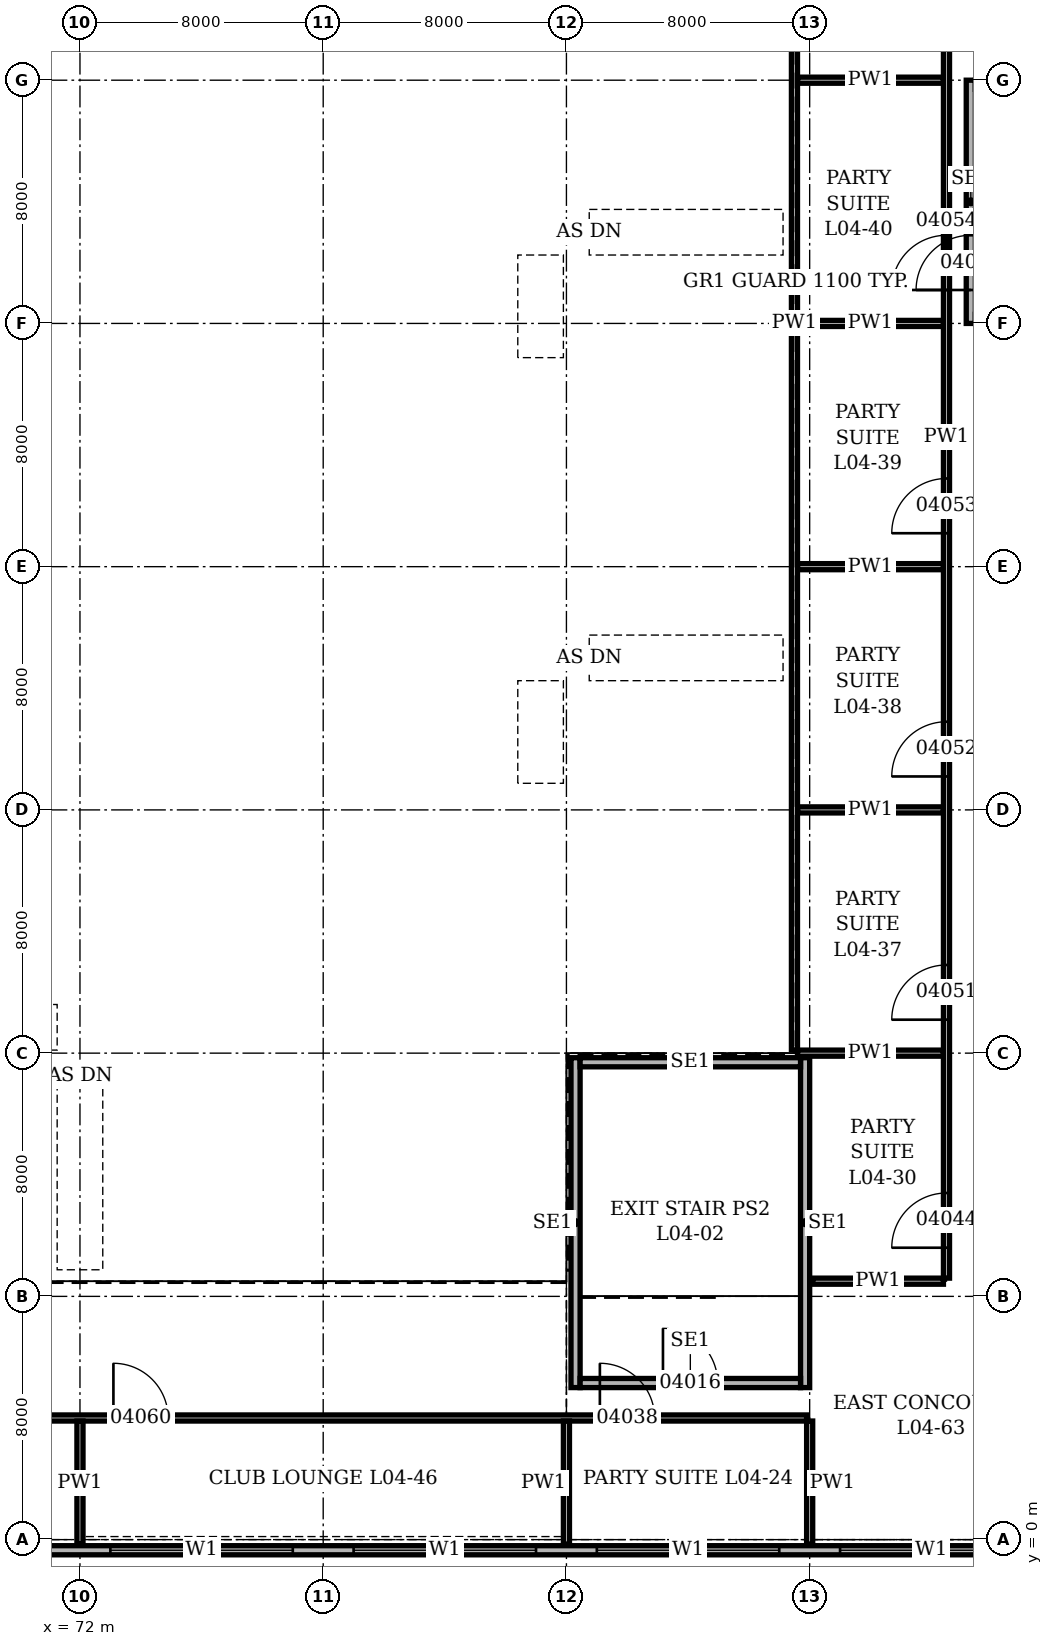
"""IFC4 building model, lengths in metres.
Left out: names, types, materials, properties, quantities, classifications, styles, units other than length and angle.
Written with IfcOpenShell. Run it as: python <this file> out.ifc"""

import sys

from ifc_helpers import new_model, si_unit, direction, frame, frame_2d, origin, place, context, subcontext, project, spatial, rectangle, extrude, element, fill, save


model = new_model("IFC4")
c1 = context("Model", 3, precision=1e-05, world=origin(), true_north=direction((0.0, 1.0)))
c2 = subcontext(c1, "Body", "Model", "MODEL_VIEW")
j1 = project(units=[si_unit("LENGTHUNIT", "METRE"), si_unit("PLANEANGLEUNIT", "RADIAN")], contexts=[c1])
p1 = place(None, origin())
s1 = spatial("IfcSite", under=j1, at=p1, CompositionType="ELEMENT")
p2 = place(p1, origin())
s2 = spatial("IfcBuilding", under=s1, at=p2, CompositionType="ELEMENT")
p3 = place(p2, frame((0.0, 0.0, 19.9)))
s3 = spatial("IfcBuildingStorey", under=s2, at=p3, CompositionType="ELEMENT", Elevation=19.9)
p4 = place(p3, frame((-0.35, -0.35, 0.0), z_axis=(0.0, 0.0, 1.0), x_axis=(1.0, 0.0, 0.0)))
e1 = element("IfcWall", 1, at=p4, inside=s3, PredefinedType="SOLIDWALL", context=c2, shape_type="SweptSolid", body=[
    extrude(rectangle(XDim=112.7, YDim=0.3, at=frame_2d((56.35, 0.0))), origin(), (0.0, 0.0, 1.0), 6.0),
])
p5 = place(p4, frame((1.35, 0.0, 1.0)))
e2 = element("IfcOpeningElement", 2, at=p5, cuts=e1, PredefinedType="OPENING", context=c2, shape_type="SweptSolid", body=[
    extrude(rectangle(XDim=6.0, YDim=1.5, at=frame_2d((3.0, 0.75))), frame((0.0, 0.16, 0.0), z_axis=(0.0, -1.0, 0.0), x_axis=(1.0, 0.0, 0.0)), (0.0, 0.0, 1.0), 0.32),
])
p6 = place(p4, frame((9.35, 0.0, 1.0)))
e3 = element("IfcOpeningElement", 3, at=p6, cuts=e1, PredefinedType="OPENING", context=c2, shape_type="SweptSolid", body=[
    extrude(rectangle(XDim=6.0, YDim=1.5, at=frame_2d((3.0, 0.75))), frame((0.0, 0.16, 0.0), z_axis=(0.0, -1.0, 0.0), x_axis=(1.0, 0.0, 0.0)), (0.0, 0.0, 1.0), 0.32),
])
p7 = place(p4, frame((17.35, 0.0, 1.0)))
e4 = element("IfcOpeningElement", 4, at=p7, cuts=e1, PredefinedType="OPENING", context=c2, shape_type="SweptSolid", body=[
    extrude(rectangle(XDim=6.0, YDim=1.5, at=frame_2d((3.0, 0.75))), frame((0.0, 0.16, 0.0), z_axis=(0.0, -1.0, 0.0), x_axis=(1.0, 0.0, 0.0)), (0.0, 0.0, 1.0), 0.32),
])
p8 = place(p4, frame((25.35, 0.0, 1.0)))
e5 = element("IfcOpeningElement", 5, at=p8, cuts=e1, PredefinedType="OPENING", context=c2, shape_type="SweptSolid", body=[
    extrude(rectangle(XDim=6.0, YDim=1.5, at=frame_2d((3.0, 0.75))), frame((0.0, 0.16, 0.0), z_axis=(0.0, -1.0, 0.0), x_axis=(1.0, 0.0, 0.0)), (0.0, 0.0, 1.0), 0.32),
])
p9 = place(p4, frame((33.35, 0.0, 1.0)))
e6 = element("IfcOpeningElement", 6, at=p9, cuts=e1, PredefinedType="OPENING", context=c2, shape_type="SweptSolid", body=[
    extrude(rectangle(XDim=6.0, YDim=1.5, at=frame_2d((3.0, 0.75))), frame((0.0, 0.16, 0.0), z_axis=(0.0, -1.0, 0.0), x_axis=(1.0, 0.0, 0.0)), (0.0, 0.0, 1.0), 0.32),
])
p10 = place(p4, frame((41.35, 0.0, 1.0)))
e7 = element("IfcOpeningElement", 7, at=p10, cuts=e1, PredefinedType="OPENING", context=c2, shape_type="SweptSolid", body=[
    extrude(rectangle(XDim=6.0, YDim=1.5, at=frame_2d((3.0, 0.75))), frame((0.0, 0.16, 0.0), z_axis=(0.0, -1.0, 0.0), x_axis=(1.0, 0.0, 0.0)), (0.0, 0.0, 1.0), 0.32),
])
p11 = place(p4, frame((49.35, 0.0, 1.0)))
e8 = element("IfcOpeningElement", 8, at=p11, cuts=e1, PredefinedType="OPENING", context=c2, shape_type="SweptSolid", body=[
    extrude(rectangle(XDim=6.0, YDim=1.5, at=frame_2d((3.0, 0.75))), frame((0.0, 0.16, 0.0), z_axis=(0.0, -1.0, 0.0), x_axis=(1.0, 0.0, 0.0)), (0.0, 0.0, 1.0), 0.32),
])
p12 = place(p4, frame((57.35, 0.0, 1.0)))
e9 = element("IfcOpeningElement", 9, at=p12, cuts=e1, PredefinedType="OPENING", context=c2, shape_type="SweptSolid", body=[
    extrude(rectangle(XDim=6.0, YDim=1.5, at=frame_2d((3.0, 0.75))), frame((0.0, 0.16, 0.0), z_axis=(0.0, -1.0, 0.0), x_axis=(1.0, 0.0, 0.0)), (0.0, 0.0, 1.0), 0.32),
])
p13 = place(p4, frame((65.35, 0.0, 1.0)))
e10 = element("IfcOpeningElement", 10, at=p13, cuts=e1, PredefinedType="OPENING", context=c2, shape_type="SweptSolid", body=[
    extrude(rectangle(XDim=6.0, YDim=1.5, at=frame_2d((3.0, 0.75))), frame((0.0, 0.16, 0.0), z_axis=(0.0, -1.0, 0.0), x_axis=(1.0, 0.0, 0.0)), (0.0, 0.0, 1.0), 0.32),
])
p14 = place(p4, frame((73.35, 0.0, 1.0)))
e11 = element("IfcOpeningElement", 11, at=p14, cuts=e1, PredefinedType="OPENING", context=c2, shape_type="SweptSolid", body=[
    extrude(rectangle(XDim=6.0, YDim=1.5, at=frame_2d((3.0, 0.75))), frame((0.0, 0.16, 0.0), z_axis=(0.0, -1.0, 0.0), x_axis=(1.0, 0.0, 0.0)), (0.0, 0.0, 1.0), 0.32),
])
p15 = place(p4, frame((81.35, 0.0, 1.0)))
e12 = element("IfcOpeningElement", 12, at=p15, cuts=e1, PredefinedType="OPENING", context=c2, shape_type="SweptSolid", body=[
    extrude(rectangle(XDim=6.0, YDim=1.5, at=frame_2d((3.0, 0.75))), frame((0.0, 0.16, 0.0), z_axis=(0.0, -1.0, 0.0), x_axis=(1.0, 0.0, 0.0)), (0.0, 0.0, 1.0), 0.32),
])
p16 = place(p4, frame((89.35, 0.0, 1.0)))
e13 = element("IfcOpeningElement", 13, at=p16, cuts=e1, PredefinedType="OPENING", context=c2, shape_type="SweptSolid", body=[
    extrude(rectangle(XDim=6.0, YDim=1.5, at=frame_2d((3.0, 0.75))), frame((0.0, 0.16, 0.0), z_axis=(0.0, -1.0, 0.0), x_axis=(1.0, 0.0, 0.0)), (0.0, 0.0, 1.0), 0.32),
])
p17 = place(p4, frame((97.35, 0.0, 1.0)))
e14 = element("IfcOpeningElement", 14, at=p17, cuts=e1, PredefinedType="OPENING", context=c2, shape_type="SweptSolid", body=[
    extrude(rectangle(XDim=6.0, YDim=1.5, at=frame_2d((3.0, 0.75))), frame((0.0, 0.16, 0.0), z_axis=(0.0, -1.0, 0.0), x_axis=(1.0, 0.0, 0.0)), (0.0, 0.0, 1.0), 0.32),
])
p18 = place(p4, frame((105.35, 0.0, 1.0)))
e15 = element("IfcOpeningElement", 15, at=p18, cuts=e1, PredefinedType="OPENING", context=c2, shape_type="SweptSolid", body=[
    extrude(rectangle(XDim=6.0, YDim=1.5, at=frame_2d((3.0, 0.75))), frame((0.0, 0.16, 0.0), z_axis=(0.0, -1.0, 0.0), x_axis=(1.0, 0.0, 0.0)), (0.0, 0.0, 1.0), 0.32),
])
for number, where, z_axis, x_axis in (
    (16, (88.3, 5.0, 0.0), (0.0, 0.0, 1.0), (0.0, 1.0, 0.0)),
    (17, (95.85, 5.0, 0.0), (0.0, 0.0, 1.0), (0.0, 1.0, 0.0)),
):
    element("IfcWall", number, at=place(p3, frame(where, z_axis=z_axis, x_axis=x_axis)), inside=s3, PredefinedType="SOLIDWALL", context=c2, shape_type="SweptSolid", body=[
        extrude(rectangle(XDim=10.85, YDim=0.3, at=frame_2d((5.425, 0.0))), origin(), (0.0, 0.0, 1.0), 5.75),
    ])
p19 = place(p3, frame((88.45, 5.15, 0.0), z_axis=(0.0, 0.0, 1.0), x_axis=(1.0, 0.0, 0.0)))
e18 = element("IfcWall", 18, at=p19, inside=s3, PredefinedType="SOLIDWALL", context=c2, shape_type="SweptSolid", body=[
    extrude(rectangle(XDim=7.25, YDim=0.3, at=frame_2d((3.625, 0.0))), origin(), (0.0, 0.0, 1.0), 5.75),
])
p20 = place(p19, frame((2.725, 0.0, 0.0)))
e19 = element("IfcOpeningElement", 19, at=p20, cuts=e18, PredefinedType="OPENING", context=c2, shape_type="SweptSolid", body=[
    extrude(rectangle(XDim=1.8, YDim=2.1, at=frame_2d((0.9, 1.05))), frame((0.0, 0.16, 0.0), z_axis=(0.0, -1.0, 0.0), x_axis=(1.0, 0.0, 0.0)), (0.0, 0.0, 1.0), 0.32),
])
p21 = place(p3, frame((88.45, 15.7, 0.0), z_axis=(0.0, 0.0, 1.0), x_axis=(1.0, 0.0, 0.0)))
e20 = element("IfcWall", 20, at=p21, inside=s3, PredefinedType="SOLIDWALL", context=c2, shape_type="SweptSolid", body=[
    extrude(rectangle(XDim=7.25, YDim=0.3, at=frame_2d((3.625, 0.0))), origin(), (0.0, 0.0, 1.0), 5.75),
])
p22 = place(p3, frame((101.3, 40.0, 0.0), z_axis=(0.0, 0.0, 1.0), x_axis=(0.0, 1.0, 0.0)))
e21 = element("IfcWall", 21, at=p22, inside=s3, PredefinedType="SOLIDWALL", context=c2, shape_type="SweptSolid", body=[
    extrude(rectangle(XDim=8.0, YDim=0.3, at=frame_2d((4.0, 0.0))), origin(), (0.0, 0.0, 1.0), 5.75),
])
p23 = place(p22, frame((1.1, 0.0, 0.0)))
e22 = element("IfcOpeningElement", 22, at=p23, cuts=e21, PredefinedType="OPENING", context=c2, shape_type="SweptSolid", body=[
    extrude(rectangle(XDim=1.8, YDim=2.1, at=frame_2d((0.9, 1.05))), frame((0.0, 0.16, 0.0), z_axis=(0.0, -1.0, 0.0), x_axis=(1.0, 0.0, 0.0)), (0.0, 0.0, 1.0), 0.32),
])
p24 = place(p3, frame((16.1, 4.0, 0.0), z_axis=(0.0, 0.0, 1.0), x_axis=(1.0, 0.0, 0.0)))
e23 = element("IfcWall", 23, at=p24, inside=s3, PredefinedType="PARTITIONING", context=c2, shape_type="SweptSolid", body=[
    extrude(rectangle(XDim=79.8, YDim=0.2, at=frame_2d((39.9, 0.0))), origin(), (0.0, 0.0, 1.0), 5.75),
])
p25 = place(p24, frame((1.0, 0.0, 0.0)))
e24 = element("IfcOpeningElement", 24, at=p25, cuts=e23, PredefinedType="OPENING", context=c2, shape_type="SweptSolid", body=[
    extrude(rectangle(XDim=1.8, YDim=2.4, at=frame_2d((0.9, 1.2))), frame((0.0, 0.11, 0.0), z_axis=(0.0, -1.0, 0.0), x_axis=(1.0, 0.0, 0.0)), (0.0, 0.0, 1.0), 0.22),
])
p26 = place(p24, frame((73.0, 0.0, 0.0)))
e25 = element("IfcOpeningElement", 25, at=p26, cuts=e23, PredefinedType="OPENING", context=c2, shape_type="SweptSolid", body=[
    extrude(rectangle(XDim=1.8, YDim=2.4, at=frame_2d((0.9, 1.2))), frame((0.0, 0.11, 0.0), z_axis=(0.0, -1.0, 0.0), x_axis=(1.0, 0.0, 0.0)), (0.0, 0.0, 1.0), 0.22),
])
p27 = place(p24, frame((9.0, 0.0, 0.0)))
e26 = element("IfcOpeningElement", 26, at=p27, cuts=e23, PredefinedType="OPENING", context=c2, shape_type="SweptSolid", body=[
    extrude(rectangle(XDim=1.8, YDim=2.4, at=frame_2d((0.9, 1.2))), frame((0.0, 0.11, 0.0), z_axis=(0.0, -1.0, 0.0), x_axis=(1.0, 0.0, 0.0)), (0.0, 0.0, 1.0), 0.22),
])
p28 = place(p24, frame((25.0, 0.0, 0.0)))
e27 = element("IfcOpeningElement", 27, at=p28, cuts=e23, PredefinedType="OPENING", context=c2, shape_type="SweptSolid", body=[
    extrude(rectangle(XDim=1.8, YDim=2.4, at=frame_2d((0.9, 1.2))), frame((0.0, 0.11, 0.0), z_axis=(0.0, -1.0, 0.0), x_axis=(1.0, 0.0, 0.0)), (0.0, 0.0, 1.0), 0.22),
])
p29 = place(p24, frame((41.0, 0.0, 0.0)))
e28 = element("IfcOpeningElement", 28, at=p29, cuts=e23, PredefinedType="OPENING", context=c2, shape_type="SweptSolid", body=[
    extrude(rectangle(XDim=1.8, YDim=2.4, at=frame_2d((0.9, 1.2))), frame((0.0, 0.11, 0.0), z_axis=(0.0, -1.0, 0.0), x_axis=(1.0, 0.0, 0.0)), (0.0, 0.0, 1.0), 0.22),
])
p30 = place(p24, frame((57.0, 0.0, 0.0)))
e29 = element("IfcOpeningElement", 29, at=p30, cuts=e23, PredefinedType="OPENING", context=c2, shape_type="SweptSolid", body=[
    extrude(rectangle(XDim=1.8, YDim=2.4, at=frame_2d((0.9, 1.2))), frame((0.0, 0.11, 0.0), z_axis=(0.0, -1.0, 0.0), x_axis=(1.0, 0.0, 0.0)), (0.0, 0.0, 1.0), 0.22),
])
p31 = place(p3, frame((96.1, 8.5, 0.0), z_axis=(0.0, 0.0, 1.0), x_axis=(1.0, 0.0, 0.0)))
e30 = element("IfcWall", 30, at=p31, inside=s3, PredefinedType="PARTITIONING", context=c2, shape_type="SweptSolid", body=[
    extrude(rectangle(XDim=4.3, YDim=0.2, at=frame_2d((2.15, 0.0))), origin(), (0.0, 0.0, 1.0), 5.75),
])
for number, where, z_axis, x_axis in (
    (31, (95.6, 16.0, 0.0), (0.0, 0.0, 1.0), (1.0, 0.0, 0.0)),
    (32, (95.6, 24.0, 0.0), (0.0, 0.0, 1.0), (1.0, 0.0, 0.0)),
    (33, (95.6, 32.0, 0.0), (0.0, 0.0, 1.0), (1.0, 0.0, 0.0)),
    (34, (95.6, 40.0, 0.0), (0.0, 0.0, 1.0), (1.0, 0.0, 0.0)),
    (35, (95.6, 48.0, 0.0), (0.0, 0.0, 1.0), (1.0, 0.0, 0.0)),
):
    element("IfcWall", number, at=place(p3, frame(where, z_axis=z_axis, x_axis=x_axis)), inside=s3, PredefinedType="PARTITIONING", context=c2, shape_type="SweptSolid", body=[
        extrude(rectangle(XDim=4.8, YDim=0.2, at=frame_2d((2.4, 0.0))), origin(), (0.0, 0.0, 1.0), 5.75),
    ])
for number, where, z_axis, x_axis in (
    (36, (72.0, -0.15, 0.0), (0.0, 0.0, 1.0), (0.0, 1.0, 0.0)),
    (37, (88.0, -0.15, 0.0), (0.0, 0.0, 1.0), (0.0, 1.0, 0.0)),
):
    element("IfcWall", number, at=place(p3, frame(where, z_axis=z_axis, x_axis=x_axis)), inside=s3, PredefinedType="PARTITIONING", context=c2, shape_type="SweptSolid", body=[
        extrude(rectangle(XDim=4.05, YDim=0.2, at=frame_2d((2.025, 0.0))), origin(), (0.0, 0.0, 1.0), 5.75),
    ])
p32 = place(p3, frame((95.5, 16.1, 0.0), z_axis=(0.0, 0.0, 1.0), x_axis=(0.0, 1.0, 0.0)))
e38 = element("IfcWall", 38, at=p32, inside=s3, PredefinedType="PARTITIONING", context=c2, shape_type="SweptSolid", body=[
    extrude(rectangle(XDim=47.8, YDim=0.2, at=frame_2d((23.9, 0.0))), origin(), (0.0, 0.0, 1.0), 5.75),
])
p33 = place(p3, frame((96.0, -0.15, 0.0), z_axis=(0.0, 0.0, 1.0), x_axis=(0.0, 1.0, 0.0)))
e39 = element("IfcWall", 39, at=p33, inside=s3, PredefinedType="PARTITIONING", context=c2, shape_type="SweptSolid", body=[
    extrude(rectangle(XDim=4.05, YDim=0.2, at=frame_2d((2.025, 0.0))), origin(), (0.0, 0.0, 1.0), 5.75),
])
p34 = place(p3, frame((100.5, 8.6, 0.0), z_axis=(0.0, 0.0, 1.0), x_axis=(0.0, 1.0, 0.0)))
e40 = element("IfcWall", 40, at=p34, inside=s3, PredefinedType="PARTITIONING", context=c2, shape_type="SweptSolid", body=[
    extrude(rectangle(XDim=55.3, YDim=0.2, at=frame_2d((27.65, 0.0))), origin(), (0.0, 0.0, 1.0), 5.75),
])
p35 = place(p34, frame((1.0, 0.0, 0.0)))
e41 = element("IfcOpeningElement", 41, at=p35, cuts=e40, PredefinedType="OPENING", context=c2, shape_type="SweptSolid", body=[
    extrude(rectangle(XDim=1.8, YDim=2.4, at=frame_2d((0.9, 1.2))), frame((0.0, 0.11, 0.0), z_axis=(0.0, -1.0, 0.0), x_axis=(1.0, 0.0, 0.0)), (0.0, 0.0, 1.0), 0.22),
])
p36 = place(p34, frame((8.5, 0.0, 0.0)))
e42 = element("IfcOpeningElement", 42, at=p36, cuts=e40, PredefinedType="OPENING", context=c2, shape_type="SweptSolid", body=[
    extrude(rectangle(XDim=1.8, YDim=2.4, at=frame_2d((0.9, 1.2))), frame((0.0, 0.11, 0.0), z_axis=(0.0, -1.0, 0.0), x_axis=(1.0, 0.0, 0.0)), (0.0, 0.0, 1.0), 0.22),
])
p37 = place(p34, frame((16.5, 0.0, 0.0)))
e43 = element("IfcOpeningElement", 43, at=p37, cuts=e40, PredefinedType="OPENING", context=c2, shape_type="SweptSolid", body=[
    extrude(rectangle(XDim=1.8, YDim=2.4, at=frame_2d((0.9, 1.2))), frame((0.0, 0.11, 0.0), z_axis=(0.0, -1.0, 0.0), x_axis=(1.0, 0.0, 0.0)), (0.0, 0.0, 1.0), 0.22),
])
p38 = place(p34, frame((24.5, 0.0, 0.0)))
e44 = element("IfcOpeningElement", 44, at=p38, cuts=e40, PredefinedType="OPENING", context=c2, shape_type="SweptSolid", body=[
    extrude(rectangle(XDim=1.8, YDim=2.4, at=frame_2d((0.9, 1.2))), frame((0.0, 0.11, 0.0), z_axis=(0.0, -1.0, 0.0), x_axis=(1.0, 0.0, 0.0)), (0.0, 0.0, 1.0), 0.22),
])
p39 = place(p34, frame((32.5, 0.0, 0.0)))
e45 = element("IfcOpeningElement", 45, at=p39, cuts=e40, PredefinedType="OPENING", context=c2, shape_type="SweptSolid", body=[
    extrude(rectangle(XDim=1.8, YDim=2.4, at=frame_2d((0.9, 1.2))), frame((0.0, 0.11, 0.0), z_axis=(0.0, -1.0, 0.0), x_axis=(1.0, 0.0, 0.0)), (0.0, 0.0, 1.0), 0.22),
])
p40 = place(p34, frame((40.5, 0.0, 0.0)))
e46 = element("IfcOpeningElement", 46, at=p40, cuts=e40, PredefinedType="OPENING", context=c2, shape_type="SweptSolid", body=[
    extrude(rectangle(XDim=1.8, YDim=2.4, at=frame_2d((0.9, 1.2))), frame((0.0, 0.11, 0.0), z_axis=(0.0, -1.0, 0.0), x_axis=(1.0, 0.0, 0.0)), (0.0, 0.0, 1.0), 0.22),
])
p41 = place(p34, frame((48.5, 0.0, 0.0)))
e47 = element("IfcOpeningElement", 47, at=p41, cuts=e40, PredefinedType="OPENING", context=c2, shape_type="SweptSolid", body=[
    extrude(rectangle(XDim=1.8, YDim=2.4, at=frame_2d((0.9, 1.2))), frame((0.0, 0.11, 0.0), z_axis=(0.0, -1.0, 0.0), x_axis=(1.0, 0.0, 0.0)), (0.0, 0.0, 1.0), 0.22),
])
p42 = place(p14, origin())
e48 = element("IfcWindow", 48, at=p42, inside=s3, PartitioningType="SINGLE_PANEL", PredefinedType="WINDOW", context=c2, shape_type="SweptSolid", body=[
    extrude(rectangle(XDim=6.0, YDim=1.5, at=frame_2d((3.0, 0.75))), frame((0.0, 0.03, 0.0), z_axis=(0.0, -1.0, 0.0), x_axis=(1.0, 0.0, 0.0)), (0.0, 0.0, 1.0), 0.06),
])
fill(e11, e48)
p43 = place(p15, origin())
e49 = element("IfcWindow", 49, at=p43, inside=s3, PartitioningType="SINGLE_PANEL", PredefinedType="WINDOW", context=c2, shape_type="SweptSolid", body=[
    extrude(rectangle(XDim=6.0, YDim=1.5, at=frame_2d((3.0, 0.75))), frame((0.0, 0.03, 0.0), z_axis=(0.0, -1.0, 0.0), x_axis=(1.0, 0.0, 0.0)), (0.0, 0.0, 1.0), 0.06),
])
fill(e12, e49)
p44 = place(p16, origin())
e50 = element("IfcWindow", 50, at=p44, inside=s3, PartitioningType="SINGLE_PANEL", PredefinedType="WINDOW", context=c2, shape_type="SweptSolid", body=[
    extrude(rectangle(XDim=6.0, YDim=1.5, at=frame_2d((3.0, 0.75))), frame((0.0, 0.03, 0.0), z_axis=(0.0, -1.0, 0.0), x_axis=(1.0, 0.0, 0.0)), (0.0, 0.0, 1.0), 0.06),
])
fill(e13, e50)
p45 = place(p17, origin())
e51 = element("IfcWindow", 51, at=p45, inside=s3, PartitioningType="SINGLE_PANEL", PredefinedType="WINDOW", context=c2, shape_type="SweptSolid", body=[
    extrude(rectangle(XDim=6.0, YDim=1.5, at=frame_2d((3.0, 0.75))), frame((0.0, 0.03, 0.0), z_axis=(0.0, -1.0, 0.0), x_axis=(1.0, 0.0, 0.0)), (0.0, 0.0, 1.0), 0.06),
])
fill(e14, e51)
p46 = place(p20, origin())
e52 = element("IfcDoor", 52, at=p46, inside=s3, OperationType="DOUBLE_DOOR_SINGLE_SWING", PredefinedType="DOOR", context=c2, shape_type="SweptSolid", body=[
    extrude(rectangle(XDim=1.8, YDim=2.1, at=frame_2d((0.9, 1.05))), frame((0.0, 0.15, 0.0), z_axis=(0.0, -1.0, 0.0), x_axis=(1.0, 0.0, 0.0)), (0.0, 0.0, 1.0), 0.3),
])
fill(e19, e52)
p47 = place(p23, origin())
e53 = element("IfcDoor", 53, at=p47, inside=s3, OperationType="DOUBLE_DOOR_SINGLE_SWING", PredefinedType="DOOR", context=c2, shape_type="SweptSolid", body=[
    extrude(rectangle(XDim=1.8, YDim=2.1, at=frame_2d((0.9, 1.05))), frame((0.0, 0.15, 0.0), z_axis=(0.0, -1.0, 0.0), x_axis=(1.0, 0.0, 0.0)), (0.0, 0.0, 1.0), 0.3),
])
fill(e22, e53)
p48 = place(p26, origin())
e54 = element("IfcDoor", 54, at=p48, inside=s3, OperationType="DOUBLE_DOOR_DOUBLE_SWING", PredefinedType="DOOR", context=c2, shape_type="SweptSolid", body=[
    extrude(rectangle(XDim=1.8, YDim=2.4, at=frame_2d((0.9, 1.2))), frame((0.0, 0.1, 0.0), z_axis=(0.0, -1.0, 0.0), x_axis=(1.0, 0.0, 0.0)), (0.0, 0.0, 1.0), 0.199),
])
fill(e25, e54)
p49 = place(p35, origin())
e55 = element("IfcDoor", 55, at=p49, inside=s3, OperationType="DOUBLE_DOOR_DOUBLE_SWING", PredefinedType="DOOR", context=c2, shape_type="SweptSolid", body=[
    extrude(rectangle(XDim=1.8, YDim=2.4, at=frame_2d((0.9, 1.2))), frame((0.0, 0.1, 0.0), z_axis=(0.0, -1.0, 0.0), x_axis=(1.0, 0.0, 0.0)), (0.0, 0.0, 1.0), 0.199),
])
fill(e41, e55)
p50 = place(p36, origin())
e56 = element("IfcDoor", 56, at=p50, inside=s3, OperationType="DOUBLE_DOOR_DOUBLE_SWING", PredefinedType="DOOR", context=c2, shape_type="SweptSolid", body=[
    extrude(rectangle(XDim=1.8, YDim=2.4, at=frame_2d((0.9, 1.2))), frame((0.0, 0.1, 0.0), z_axis=(0.0, -1.0, 0.0), x_axis=(1.0, 0.0, 0.0)), (0.0, 0.0, 1.0), 0.199),
])
fill(e42, e56)
p51 = place(p37, origin())
e57 = element("IfcDoor", 57, at=p51, inside=s3, OperationType="DOUBLE_DOOR_DOUBLE_SWING", PredefinedType="DOOR", context=c2, shape_type="SweptSolid", body=[
    extrude(rectangle(XDim=1.8, YDim=2.4, at=frame_2d((0.9, 1.2))), frame((0.0, 0.1, 0.0), z_axis=(0.0, -1.0, 0.0), x_axis=(1.0, 0.0, 0.0)), (0.0, 0.0, 1.0), 0.199),
])
fill(e43, e57)
p52 = place(p38, origin())
e58 = element("IfcDoor", 58, at=p52, inside=s3, OperationType="DOUBLE_DOOR_DOUBLE_SWING", PredefinedType="DOOR", context=c2, shape_type="SweptSolid", body=[
    extrude(rectangle(XDim=1.8, YDim=2.4, at=frame_2d((0.9, 1.2))), frame((0.0, 0.1, 0.0), z_axis=(0.0, -1.0, 0.0), x_axis=(1.0, 0.0, 0.0)), (0.0, 0.0, 1.0), 0.199),
])
fill(e44, e58)
p53 = place(p39, origin())
e59 = element("IfcDoor", 59, at=p53, inside=s3, OperationType="DOUBLE_DOOR_DOUBLE_SWING", PredefinedType="DOOR", context=c2, shape_type="SweptSolid", body=[
    extrude(rectangle(XDim=1.8, YDim=2.4, at=frame_2d((0.9, 1.2))), frame((0.0, 0.1, 0.0), z_axis=(0.0, -1.0, 0.0), x_axis=(1.0, 0.0, 0.0)), (0.0, 0.0, 1.0), 0.199),
])
fill(e45, e59)
p54 = place(p30, origin())
e60 = element("IfcDoor", 60, at=p54, inside=s3, OperationType="DOUBLE_DOOR_DOUBLE_SWING", PredefinedType="DOOR", context=c2, shape_type="SweptSolid", body=[
    extrude(rectangle(XDim=1.8, YDim=2.4, at=frame_2d((0.9, 1.2))), frame((0.0, 0.1, 0.0), z_axis=(0.0, -1.0, 0.0), x_axis=(1.0, 0.0, 0.0)), (0.0, 0.0, 1.0), 0.199),
])
fill(e29, e60)
save(model, sys.argv[1])
